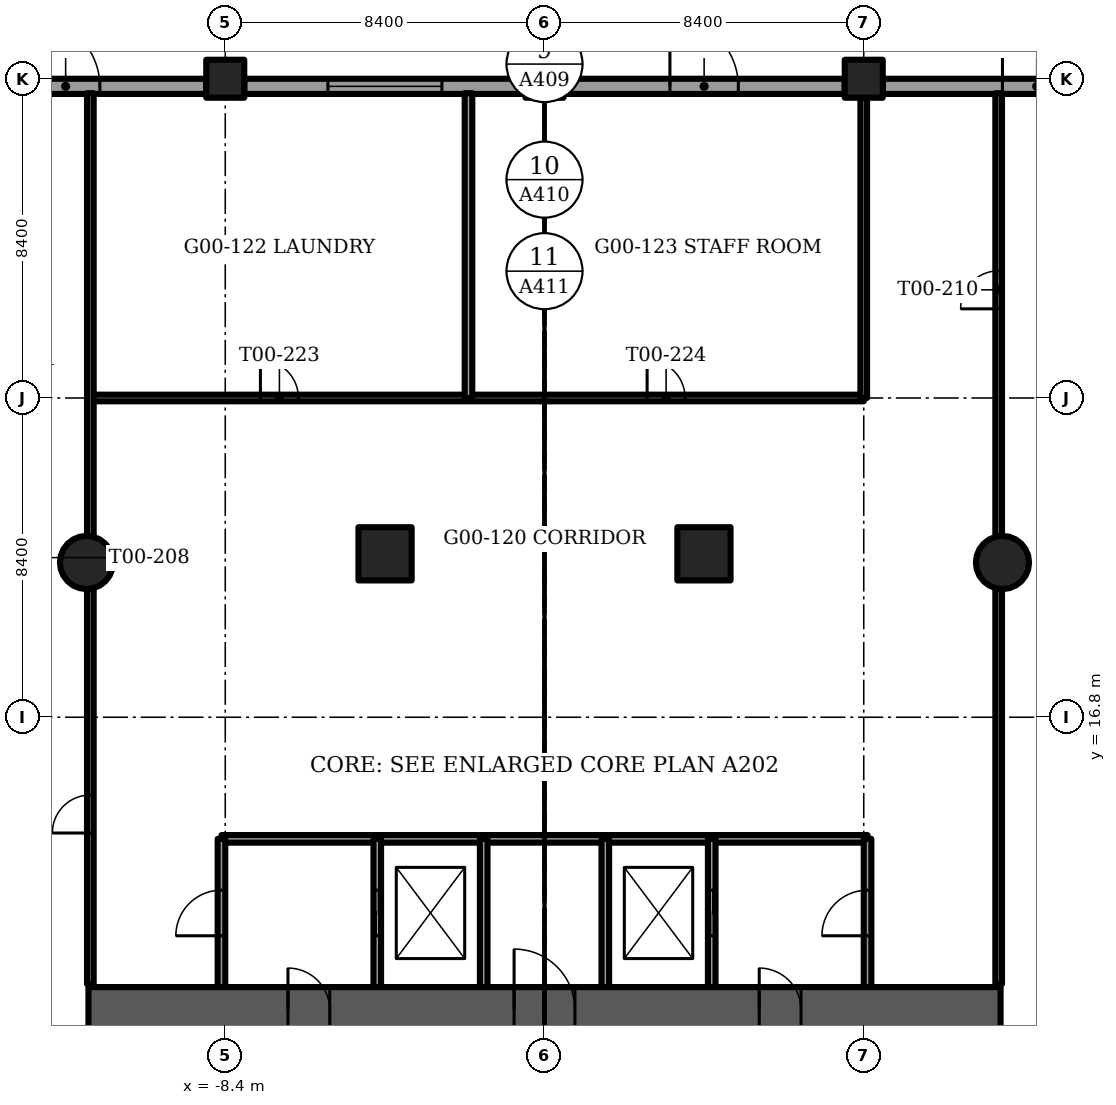
"""IFC4 building model, lengths in metres.
Left out: names, types, materials, properties, quantities, classifications, styles, units other than length and angle.
Written with IfcOpenShell. Run it as: python <this file> out.ifc"""

import sys

from ifc_helpers import new_model, si_unit, direction, frame, frame_2d, origin, origin_2d, place, context, subcontext, project, spatial, rectangle, circle, extrude, element, fill, save


model = new_model("IFC4")
c1 = context("Model", 3, precision=1e-05, world=origin(), true_north=direction((0.0, 1.0)))
c2 = subcontext(c1, "Body", "Model", "MODEL_VIEW")
j1 = project(units=[si_unit("LENGTHUNIT", "METRE"), si_unit("PLANEANGLEUNIT", "RADIAN")], contexts=[c1])
p1 = place(None, origin())
s1 = spatial("IfcSite", under=j1, at=p1, CompositionType="ELEMENT")
p2 = place(p1, origin())
s2 = spatial("IfcBuilding", under=s1, at=p2, CompositionType="ELEMENT")
p3 = place(p2, origin())
s3 = spatial("IfcBuildingStorey", under=s2, at=p3, CompositionType="ELEMENT", Elevation=0.0)
for number, where, z_axis, x_axis in (
    (1, (-8.4, 33.6, -0.35), (0.0, 0.0, 1.0), (1.0, 0.0, 0.0)),
    (2, (0.0, 33.6, -0.35), (0.0, 0.0, 1.0), (1.0, 0.0, 0.0)),
    (3, (8.4, 33.6, -0.35), (0.0, 0.0, 1.0), (1.0, 0.0, 0.0)),
):
    element("IfcColumn", number, at=place(p3, frame(where, z_axis=z_axis, x_axis=x_axis)), inside=s3, PredefinedType="COLUMN", context=c2, shape_type="SweptSolid", body=[
        extrude(rectangle(XDim=1.0, YDim=1.0, at=origin_2d()), origin(), (0.0, 0.0, 1.0), 6.0),
    ])
for number, where, z_axis, x_axis in (
    (4, (-12.051, 20.872, -0.35), (0.0, 0.0, 1.0), (1.0, 0.0, 0.0)),
    (5, (12.051, 20.872, -0.35), (0.0, 0.0, 1.0), (1.0, 0.0, 0.0)),
):
    element("IfcColumn", number, at=place(p3, frame(where, z_axis=z_axis, x_axis=x_axis)), inside=s3, PredefinedType="COLUMN", context=c2, shape_type="SweptSolid", body=[
        extrude(circle(Radius=0.7, at=origin_2d()), origin(), (0.0, 0.0, 1.0), 5.15),
    ])
for number, where, z_axis, x_axis in (
    (6, (4.195, 21.1, -0.35), (0.0, 0.0, 1.0), (1.0, 0.0, 0.0)),
    (7, (-4.195, 21.1, -0.35), (0.0, 0.0, 1.0), (1.0, 0.0, 0.0)),
):
    element("IfcColumn", number, at=place(p3, frame(where, z_axis=z_axis, x_axis=x_axis)), inside=s3, PredefinedType="COLUMN", context=c2, shape_type="SweptSolid", body=[
        extrude(rectangle(XDim=1.4, YDim=1.4, at=origin_2d()), origin(), (0.0, 0.0, 1.0), 5.15),
    ])
p4 = place(p3, frame((-12.0, 9.1, -0.35), z_axis=(0.0, 0.0, 1.0), x_axis=(1.0, 0.0, 0.0)))
e8 = element("IfcWall", 8, at=p4, inside=s3, PredefinedType="SHEAR", context=c2, shape_type="SweptSolid", body=[
    extrude(rectangle(XDim=24.0, YDim=1.2, at=frame_2d((12.0, 0.0))), origin(), (0.0, 0.0, 1.0), 6.0),
])
p5 = place(p4, frame((11.2, 0.0, 0.0)))
e9 = element("IfcOpeningElement", 9, at=p5, cuts=e8, PredefinedType="OPENING", context=c2, shape_type="SweptSolid", body=[
    extrude(rectangle(XDim=1.6, YDim=2.1, at=frame_2d((0.8, 1.05))), frame((0.0, 0.6, 0.0), z_axis=(0.0, -1.0, 0.0), x_axis=(1.0, 0.0, 0.0)), (0.0, 0.0, 1.0), 1.2),
])
p6 = place(p4, frame((5.25, 0.0, 0.0)))
e10 = element("IfcOpeningElement", 10, at=p6, cuts=e8, PredefinedType="OPENING", context=c2, shape_type="SweptSolid", body=[
    extrude(rectangle(XDim=1.1, YDim=2.1, at=frame_2d((0.55, 1.05))), frame((0.0, 0.6, 0.0), z_axis=(0.0, -1.0, 0.0), x_axis=(1.0, 0.0, 0.0)), (0.0, 0.0, 1.0), 1.2),
])
p7 = place(p4, frame((17.65, 0.0, 0.0)))
e11 = element("IfcOpeningElement", 11, at=p7, cuts=e8, PredefinedType="OPENING", context=c2, shape_type="SweptSolid", body=[
    extrude(rectangle(XDim=1.1, YDim=2.1, at=frame_2d((0.55, 1.05))), frame((0.0, 0.6, 0.0), z_axis=(0.0, -1.0, 0.0), x_axis=(1.0, 0.0, 0.0)), (0.0, 0.0, 1.0), 1.2),
])
p8 = place(p3, frame((-16.3, 33.4, 0.0), z_axis=(0.0, 0.0, 1.0), x_axis=(1.0, 0.0, 0.0)))
e12 = element("IfcWall", 12, at=p8, inside=s3, PredefinedType="SOLIDWALL", context=c2, shape_type="SweptSolid", body=[
    extrude(rectangle(XDim=7.4, YDim=0.4, at=frame_2d((3.7, 0.0))), origin(), (0.0, 0.0, 1.0), 5.65),
])
p9 = place(p8, frame((2.8, 0.0, 0.0)))
e13 = element("IfcOpeningElement", 13, at=p9, cuts=e12, PredefinedType="OPENING", context=c2, shape_type="SweptSolid", body=[
    extrude(rectangle(XDim=1.8, YDim=2.4, at=frame_2d((0.9, 1.2))), frame((0.0, 0.2, 0.0), z_axis=(0.0, -1.0, 0.0), x_axis=(1.0, 0.0, 0.0)), (0.0, 0.0, 1.0), 0.4),
])
p10 = place(p3, frame((-7.9, 33.4, 0.0), z_axis=(0.0, 0.0, 1.0), x_axis=(1.0, 0.0, 0.0)))
e14 = element("IfcWall", 14, at=p10, inside=s3, PredefinedType="SOLIDWALL", context=c2, shape_type="SweptSolid", body=[
    extrude(rectangle(XDim=7.4, YDim=0.4, at=frame_2d((3.7, 0.0))), origin(), (0.0, 0.0, 1.0), 5.65),
])
p11 = place(p10, frame((2.2, 0.0, 1.0)))
e15 = element("IfcOpeningElement", 15, at=p11, cuts=e14, PredefinedType="OPENING", context=c2, shape_type="SweptSolid", body=[
    extrude(rectangle(XDim=3.0, YDim=2.2, at=frame_2d((1.5, 1.1))), frame((0.0, 0.2, 0.0), z_axis=(0.0, -1.0, 0.0), x_axis=(1.0, 0.0, 0.0)), (0.0, 0.0, 1.0), 0.4),
])
p12 = place(p3, frame((0.5, 33.4, 0.0), z_axis=(0.0, 0.0, 1.0), x_axis=(1.0, 0.0, 0.0)))
e16 = element("IfcWall", 16, at=p12, inside=s3, PredefinedType="SOLIDWALL", context=c2, shape_type="SweptSolid", body=[
    extrude(rectangle(XDim=7.4, YDim=0.4, at=frame_2d((3.7, 0.0))), origin(), (0.0, 0.0, 1.0), 5.65),
])
p13 = place(p12, frame((2.8, 0.0, 0.0)))
e17 = element("IfcOpeningElement", 17, at=p13, cuts=e16, PredefinedType="OPENING", context=c2, shape_type="SweptSolid", body=[
    extrude(rectangle(XDim=1.8, YDim=2.4, at=frame_2d((0.9, 1.2))), frame((0.0, 0.2, 0.0), z_axis=(0.0, -1.0, 0.0), x_axis=(1.0, 0.0, 0.0)), (0.0, 0.0, 1.0), 0.4),
])
p14 = place(p3, frame((8.9, 33.4, 0.0), z_axis=(0.0, 0.0, 1.0), x_axis=(1.0, 0.0, 0.0)))
e18 = element("IfcWall", 18, at=p14, inside=s3, PredefinedType="SOLIDWALL", context=c2, shape_type="SweptSolid", body=[
    extrude(rectangle(XDim=7.4, YDim=0.4, at=frame_2d((3.7, 0.0))), origin(), (0.0, 0.0, 1.0), 5.65),
])
p15 = place(p14, frame((3.15, 0.0, 0.0)))
e19 = element("IfcOpeningElement", 19, at=p15, cuts=e18, PredefinedType="OPENING", context=c2, shape_type="SweptSolid", body=[
    extrude(rectangle(XDim=1.8, YDim=2.1, at=frame_2d((0.9, 1.05))), frame((0.0, 0.2, 0.0), z_axis=(0.0, -1.0, 0.0), x_axis=(1.0, 0.0, 0.0)), (0.0, 0.0, 1.0), 0.4),
])
p16 = place(p3, frame((-8.5, 13.6, 0.0), z_axis=(0.0, 0.0, 1.0), x_axis=(1.0, 0.0, 0.0)))
e20 = element("IfcWall", 20, at=p16, inside=s3, PredefinedType="PARTITIONING", context=c2, shape_type="SweptSolid", body=[
    extrude(rectangle(XDim=17.0, YDim=0.2, at=frame_2d((8.5, 0.0))), origin(), (0.0, 0.0, 1.0), 5.65),
])
p17 = place(p3, frame((-8.5, 9.7, 0.0), z_axis=(0.0, 0.0, 1.0), x_axis=(0.0, 1.0, 0.0)))
e21 = element("IfcWall", 21, at=p17, inside=s3, PredefinedType="PARTITIONING", context=c2, shape_type="SweptSolid", body=[
    extrude(rectangle(XDim=3.9, YDim=0.2, at=frame_2d((1.95, 0.0))), origin(), (0.0, 0.0, 1.0), 5.65),
])
p18 = place(p17, frame((1.35, 0.0, 0.0)))
e22 = element("IfcOpeningElement", 22, at=p18, cuts=e21, PredefinedType="OPENING", context=c2, shape_type="SweptSolid", body=[
    extrude(rectangle(XDim=1.2, YDim=2.1, at=frame_2d((0.6, 1.05))), frame((0.0, 0.1, 0.0), z_axis=(0.0, -1.0, 0.0), x_axis=(1.0, 0.0, 0.0)), (0.0, 0.0, 1.0), 0.2),
])
p19 = place(p3, frame((8.5, 9.7, 0.0), z_axis=(0.0, 0.0, 1.0), x_axis=(0.0, 1.0, 0.0)))
e23 = element("IfcWall", 23, at=p19, inside=s3, PredefinedType="PARTITIONING", context=c2, shape_type="SweptSolid", body=[
    extrude(rectangle(XDim=3.9, YDim=0.2, at=frame_2d((1.95, 0.0))), origin(), (0.0, 0.0, 1.0), 5.65),
])
p20 = place(p19, frame((1.35, 0.0, 0.0)))
e24 = element("IfcOpeningElement", 24, at=p20, cuts=e23, PredefinedType="OPENING", context=c2, shape_type="SweptSolid", body=[
    extrude(rectangle(XDim=1.2, YDim=2.1, at=frame_2d((0.6, 1.05))), frame((0.0, 0.1, 0.0), z_axis=(0.0, -1.0, 0.0), x_axis=(1.0, 0.0, 0.0)), (0.0, 0.0, 1.0), 0.2),
])
p21 = place(p3, frame((-4.4, 9.7, 0.0), z_axis=(0.0, 0.0, 1.0), x_axis=(0.0, 1.0, 0.0)))
e25 = element("IfcWall", 25, at=p21, inside=s3, PredefinedType="PARTITIONING", context=c2, shape_type="SweptSolid", body=[
    extrude(rectangle(XDim=3.9, YDim=0.2, at=frame_2d((1.95, 0.0))), origin(), (0.0, 0.0, 1.0), 5.65),
])
p22 = place(p21, frame((1.35, 0.0, 0.0)))
e26 = element("IfcOpeningElement", 26, at=p22, cuts=e25, PredefinedType="OPENING", context=c2, shape_type="SweptSolid", body=[
    extrude(rectangle(XDim=1.2, YDim=2.1, at=frame_2d((0.6, 1.05))), frame((0.0, 0.1, 0.0), z_axis=(0.0, -1.0, 0.0), x_axis=(1.0, 0.0, 0.0)), (0.0, 0.0, 1.0), 0.2),
])
p23 = place(p3, frame((4.4, 9.7, 0.0), z_axis=(0.0, 0.0, 1.0), x_axis=(0.0, 1.0, 0.0)))
e27 = element("IfcWall", 27, at=p23, inside=s3, PredefinedType="PARTITIONING", context=c2, shape_type="SweptSolid", body=[
    extrude(rectangle(XDim=3.9, YDim=0.2, at=frame_2d((1.95, 0.0))), origin(), (0.0, 0.0, 1.0), 5.65),
])
p24 = place(p23, frame((1.35, 0.0, 0.0)))
e28 = element("IfcOpeningElement", 28, at=p24, cuts=e27, PredefinedType="OPENING", context=c2, shape_type="SweptSolid", body=[
    extrude(rectangle(XDim=1.2, YDim=2.1, at=frame_2d((0.6, 1.05))), frame((0.0, 0.1, 0.0), z_axis=(0.0, -1.0, 0.0), x_axis=(1.0, 0.0, 0.0)), (0.0, 0.0, 1.0), 0.2),
])
for number, where, z_axis, x_axis in (
    (29, (-1.6, 9.7, 0.0), (0.0, 0.0, 1.0), (0.0, 1.0, 0.0)),
    (30, (1.6, 9.7, 0.0), (0.0, 0.0, 1.0), (0.0, 1.0, 0.0)),
):
    element("IfcWall", number, at=place(p3, frame(where, z_axis=z_axis, x_axis=x_axis)), inside=s3, PredefinedType="PARTITIONING", context=c2, shape_type="SweptSolid", body=[
        extrude(rectangle(XDim=3.9, YDim=0.2, at=frame_2d((1.95, 0.0))), origin(), (0.0, 0.0, 1.0), 5.65),
    ])
p25 = place(p3, frame((-11.95, 25.2, 0.0), z_axis=(0.0, 0.0, 1.0), x_axis=(1.0, 0.0, 0.0)))
e31 = element("IfcWall", 31, at=p25, inside=s3, PredefinedType="PARTITIONING", context=c2, shape_type="SweptSolid", body=[
    extrude(rectangle(XDim=20.35, YDim=0.175, at=frame_2d((10.175, 0.0))), origin(), (0.0, 0.0, 1.0), 5.65),
])
p26 = place(p25, frame((4.475, 0.0, 0.0)))
e32 = element("IfcOpeningElement", 32, at=p26, cuts=e31, PredefinedType="OPENING", context=c2, shape_type="SweptSolid", body=[
    extrude(rectangle(XDim=1.0, YDim=2.1, at=frame_2d((0.5, 1.05))), frame((0.0, 0.087, 0.0), z_axis=(0.0, -1.0, 0.0), x_axis=(1.0, 0.0, 0.0)), (0.0, 0.0, 1.0), 0.175),
])
p27 = place(p25, frame((14.65, 0.0, 0.0)))
e33 = element("IfcOpeningElement", 33, at=p27, cuts=e31, PredefinedType="OPENING", context=c2, shape_type="SweptSolid", body=[
    extrude(rectangle(XDim=1.0, YDim=2.1, at=frame_2d((0.5, 1.05))), frame((0.0, 0.087, 0.0), z_axis=(0.0, -1.0, 0.0), x_axis=(1.0, 0.0, 0.0)), (0.0, 0.0, 1.0), 0.175),
])
p28 = place(p3, frame((-11.95, 9.78, 0.0), z_axis=(0.0, 0.0, 1.0), x_axis=(0.0, 1.0, 0.0)))
e34 = element("IfcWall", 34, at=p28, inside=s3, PredefinedType="PARTITIONING", context=c2, shape_type="SweptSolid", body=[
    extrude(rectangle(XDim=10.402, YDim=0.175, at=frame_2d((5.201, 0.0))), origin(), (0.0, 0.0, 1.0), 5.65),
])
p29 = place(p28, frame((3.974, 0.0, 0.0)))
e35 = element("IfcOpeningElement", 35, at=p29, cuts=e34, PredefinedType="OPENING", context=c2, shape_type="SweptSolid", body=[
    extrude(rectangle(XDim=1.0, YDim=2.1, at=frame_2d((0.5, 1.05))), frame((0.0, 0.087, 0.0), z_axis=(0.0, -1.0, 0.0), x_axis=(1.0, 0.0, 0.0)), (0.0, 0.0, 1.0), 0.175),
])
p30 = place(p3, frame((-11.95, 21.562, 0.0), z_axis=(0.0, 0.0, 1.0), x_axis=(0.0, 1.0, 0.0)))
e36 = element("IfcWall", 36, at=p30, inside=s3, PredefinedType="PARTITIONING", context=c2, shape_type="SweptSolid", body=[
    extrude(rectangle(XDim=11.658, YDim=0.175, at=frame_2d((5.829, 0.0))), origin(), (0.0, 0.0, 1.0), 5.65),
])
p31 = place(p3, frame((8.4, 25.2, 0.0), z_axis=(0.0, 0.0, 1.0), x_axis=(0.0, 1.0, 0.0)))
e37 = element("IfcWall", 37, at=p31, inside=s3, PredefinedType="PARTITIONING", context=c2, shape_type="SweptSolid", body=[
    extrude(rectangle(XDim=7.9, YDim=0.175, at=frame_2d((3.95, 0.0))), origin(), (0.0, 0.0, 1.0), 5.65),
])
p32 = place(p3, frame((11.95, 9.78, 0.0), z_axis=(0.0, 0.0, 1.0), x_axis=(0.0, 1.0, 0.0)))
e38 = element("IfcWall", 38, at=p32, inside=s3, PredefinedType="PARTITIONING", context=c2, shape_type="SweptSolid", body=[
    extrude(rectangle(XDim=10.402, YDim=0.175, at=frame_2d((5.201, 0.0))), origin(), (0.0, 0.0, 1.0), 5.65),
])
p33 = place(p3, frame((11.95, 21.562, 0.0), z_axis=(0.0, 0.0, 1.0), x_axis=(0.0, 1.0, 0.0)))
e39 = element("IfcWall", 39, at=p33, inside=s3, PredefinedType="PARTITIONING", context=c2, shape_type="SweptSolid", body=[
    extrude(rectangle(XDim=11.658, YDim=0.175, at=frame_2d((5.829, 0.0))), origin(), (0.0, 0.0, 1.0), 5.65),
])
p34 = place(p33, frame((5.984, 0.0, 0.0)))
e40 = element("IfcOpeningElement", 40, at=p34, cuts=e39, PredefinedType="OPENING", context=c2, shape_type="SweptSolid", body=[
    extrude(rectangle(XDim=1.0, YDim=2.1, at=frame_2d((0.5, 1.05))), frame((0.0, 0.087, 0.0), z_axis=(0.0, -1.0, 0.0), x_axis=(1.0, 0.0, 0.0)), (0.0, 0.0, 1.0), 0.175),
])
p35 = place(p3, frame((-2.0, 25.2, 0.0), z_axis=(0.0, 0.0, 1.0), x_axis=(0.0, 1.0, 0.0)))
e41 = element("IfcWall", 41, at=p35, inside=s3, PredefinedType="PARTITIONING", context=c2, shape_type="SweptSolid", body=[
    extrude(rectangle(XDim=8.02, YDim=0.2, at=frame_2d((4.01, 0.0))), origin(), (0.0, 0.0, 1.0), 5.65),
])
p36 = place(p9, origin())
e42 = element("IfcDoor", 42, at=p36, inside=s3, OperationType="SINGLE_SWING_LEFT", PredefinedType="DOOR", context=c2, shape_type="SweptSolid", body=[
    extrude(rectangle(XDim=1.8, YDim=2.4, at=frame_2d((0.9, 1.2))), frame((0.0, 0.025, 0.0), z_axis=(0.0, -1.0, 0.0), x_axis=(1.0, 0.0, 0.0)), (0.0, 0.0, 1.0), 0.05),
])
fill(e13, e42)
p37 = place(p11, origin())
e43 = element("IfcWindow", 43, at=p37, inside=s3, PartitioningType="SINGLE_PANEL", PredefinedType="WINDOW", context=c2, shape_type="SweptSolid", body=[
    extrude(rectangle(XDim=3.0, YDim=2.2, at=frame_2d((1.5, 1.1))), frame((0.0, 0.03, 0.0), z_axis=(0.0, -1.0, 0.0), x_axis=(1.0, 0.0, 0.0)), (0.0, 0.0, 1.0), 0.06),
])
fill(e15, e43)
p38 = place(p13, origin())
e44 = element("IfcDoor", 44, at=p38, inside=s3, OperationType="SINGLE_SWING_LEFT", PredefinedType="DOOR", context=c2, shape_type="SweptSolid", body=[
    extrude(rectangle(XDim=1.8, YDim=2.4, at=frame_2d((0.9, 1.2))), frame((0.0, 0.025, 0.0), z_axis=(0.0, -1.0, 0.0), x_axis=(1.0, 0.0, 0.0)), (0.0, 0.0, 1.0), 0.05),
])
fill(e17, e44)
p39 = place(p5, origin())
e45 = element("IfcDoor", 45, at=p39, inside=s3, OperationType="DOUBLE_DOOR_SINGLE_SWING", PredefinedType="DOOR", context=c2, shape_type="SweptSolid", body=[
    extrude(rectangle(XDim=1.6, YDim=2.1, at=frame_2d((0.8, 1.05))), frame((0.0, 0.025, 0.0), z_axis=(0.0, -1.0, 0.0), x_axis=(1.0, 0.0, 0.0)), (0.0, 0.0, 1.0), 0.05),
])
fill(e9, e45)
p40 = place(p6, origin())
e46 = element("IfcDoor", 46, at=p40, inside=s3, OperationType="SINGLE_SWING_LEFT", PredefinedType="DOOR", context=c2, shape_type="SweptSolid", body=[
    extrude(rectangle(XDim=1.1, YDim=2.1, at=frame_2d((0.55, 1.05))), frame((0.0, 0.025, 0.0), z_axis=(0.0, -1.0, 0.0), x_axis=(1.0, 0.0, 0.0)), (0.0, 0.0, 1.0), 0.05),
])
fill(e10, e46)
p41 = place(p7, origin())
e47 = element("IfcDoor", 47, at=p41, inside=s3, OperationType="SINGLE_SWING_RIGHT", PredefinedType="DOOR", context=c2, shape_type="SweptSolid", body=[
    extrude(rectangle(XDim=1.1, YDim=2.1, at=frame_2d((0.55, 1.05))), frame((0.0, 0.025, 0.0), z_axis=(0.0, -1.0, 0.0), x_axis=(1.0, 0.0, 0.0)), (0.0, 0.0, 1.0), 0.05),
])
fill(e11, e47)
p42 = place(p22, origin())
e48 = element("IfcDoor", 48, at=p42, inside=s3, OperationType="SLIDING_TO_LEFT", PredefinedType="DOOR", context=c2, shape_type="SweptSolid", body=[
    extrude(rectangle(XDim=1.2, YDim=2.1, at=frame_2d((0.6, 1.05))), frame((0.0, 0.025, 0.0), z_axis=(0.0, -1.0, 0.0), x_axis=(1.0, 0.0, 0.0)), (0.0, 0.0, 1.0), 0.05),
])
fill(e26, e48)
p43 = place(p18, origin())
e49 = element("IfcDoor", 49, at=p43, inside=s3, OperationType="SINGLE_SWING_LEFT", PredefinedType="DOOR", context=c2, shape_type="SweptSolid", body=[
    extrude(rectangle(XDim=1.2, YDim=2.1, at=frame_2d((0.6, 1.05))), frame((0.0, 0.025, 0.0), z_axis=(0.0, -1.0, 0.0), x_axis=(1.0, 0.0, 0.0)), (0.0, 0.0, 1.0), 0.05),
])
fill(e22, e49)
p44 = place(p24, origin())
e50 = element("IfcDoor", 50, at=p44, inside=s3, OperationType="SLIDING_TO_LEFT", PredefinedType="DOOR", context=c2, shape_type="SweptSolid", body=[
    extrude(rectangle(XDim=1.2, YDim=2.1, at=frame_2d((0.6, 1.05))), frame((0.0, 0.025, 0.0), z_axis=(0.0, -1.0, 0.0), x_axis=(1.0, 0.0, 0.0)), (0.0, 0.0, 1.0), 0.05),
])
fill(e28, e50)
p45 = place(p20, origin())
e51 = element("IfcDoor", 51, at=p45, inside=s3, OperationType="SINGLE_SWING_LEFT", PredefinedType="DOOR", context=c2, shape_type="SweptSolid", body=[
    extrude(rectangle(XDim=1.2, YDim=2.1, at=frame_2d((0.6, 1.05))), frame((0.0, 0.025, 0.0), z_axis=(0.0, -1.0, 0.0), x_axis=(1.0, 0.0, 0.0)), (0.0, 0.0, 1.0), 0.05),
])
fill(e24, e51)
p46 = place(p29, origin())
e52 = element("IfcDoor", 52, at=p46, inside=s3, OperationType="SINGLE_SWING_LEFT", PredefinedType="DOOR", context=c2, shape_type="SweptSolid", body=[
    extrude(rectangle(XDim=1.0, YDim=2.1, at=frame_2d((0.5, 1.05))), frame((0.0, 0.025, 0.0), z_axis=(0.0, -1.0, 0.0), x_axis=(1.0, 0.0, 0.0)), (0.0, 0.0, 1.0), 0.05),
])
fill(e35, e52)
p47 = place(p34, origin())
e53 = element("IfcDoor", 53, at=p47, inside=s3, OperationType="SINGLE_SWING_RIGHT", PredefinedType="DOOR", context=c2, shape_type="SweptSolid", body=[
    extrude(rectangle(XDim=1.0, YDim=2.1, at=frame_2d((0.5, 1.05))), frame((0.0, 0.025, 0.0), z_axis=(0.0, -1.0, 0.0), x_axis=(1.0, 0.0, 0.0)), (0.0, 0.0, 1.0), 0.05),
])
fill(e40, e53)
p48 = place(p26, origin())
e54 = element("IfcDoor", 54, at=p48, inside=s3, OperationType="SINGLE_SWING_LEFT", PredefinedType="DOOR", context=c2, shape_type="SweptSolid", body=[
    extrude(rectangle(XDim=1.0, YDim=2.1, at=frame_2d((0.5, 1.05))), frame((0.0, 0.025, 0.0), z_axis=(0.0, -1.0, 0.0), x_axis=(1.0, 0.0, 0.0)), (0.0, 0.0, 1.0), 0.05),
])
fill(e32, e54)
p49 = place(p27, origin())
e55 = element("IfcDoor", 55, at=p49, inside=s3, OperationType="SINGLE_SWING_RIGHT", PredefinedType="DOOR", context=c2, shape_type="SweptSolid", body=[
    extrude(rectangle(XDim=1.0, YDim=2.1, at=frame_2d((0.5, 1.05))), frame((0.0, 0.025, 0.0), z_axis=(0.0, -1.0, 0.0), x_axis=(1.0, 0.0, 0.0)), (0.0, 0.0, 1.0), 0.05),
])
fill(e33, e55)
p50 = place(p15, origin())
e56 = element("IfcDoor", 56, at=p50, inside=s3, OperationType="SINGLE_SWING_LEFT", PredefinedType="DOOR", context=c2, shape_type="SweptSolid", body=[
    extrude(rectangle(XDim=1.8, YDim=2.1, at=frame_2d((0.9, 1.05))), frame((0.0, 0.025, 0.0), z_axis=(0.0, -1.0, 0.0), x_axis=(1.0, 0.0, 0.0)), (0.0, 0.0, 1.0), 0.05),
])
fill(e19, e56)
save(model, sys.argv[1])
